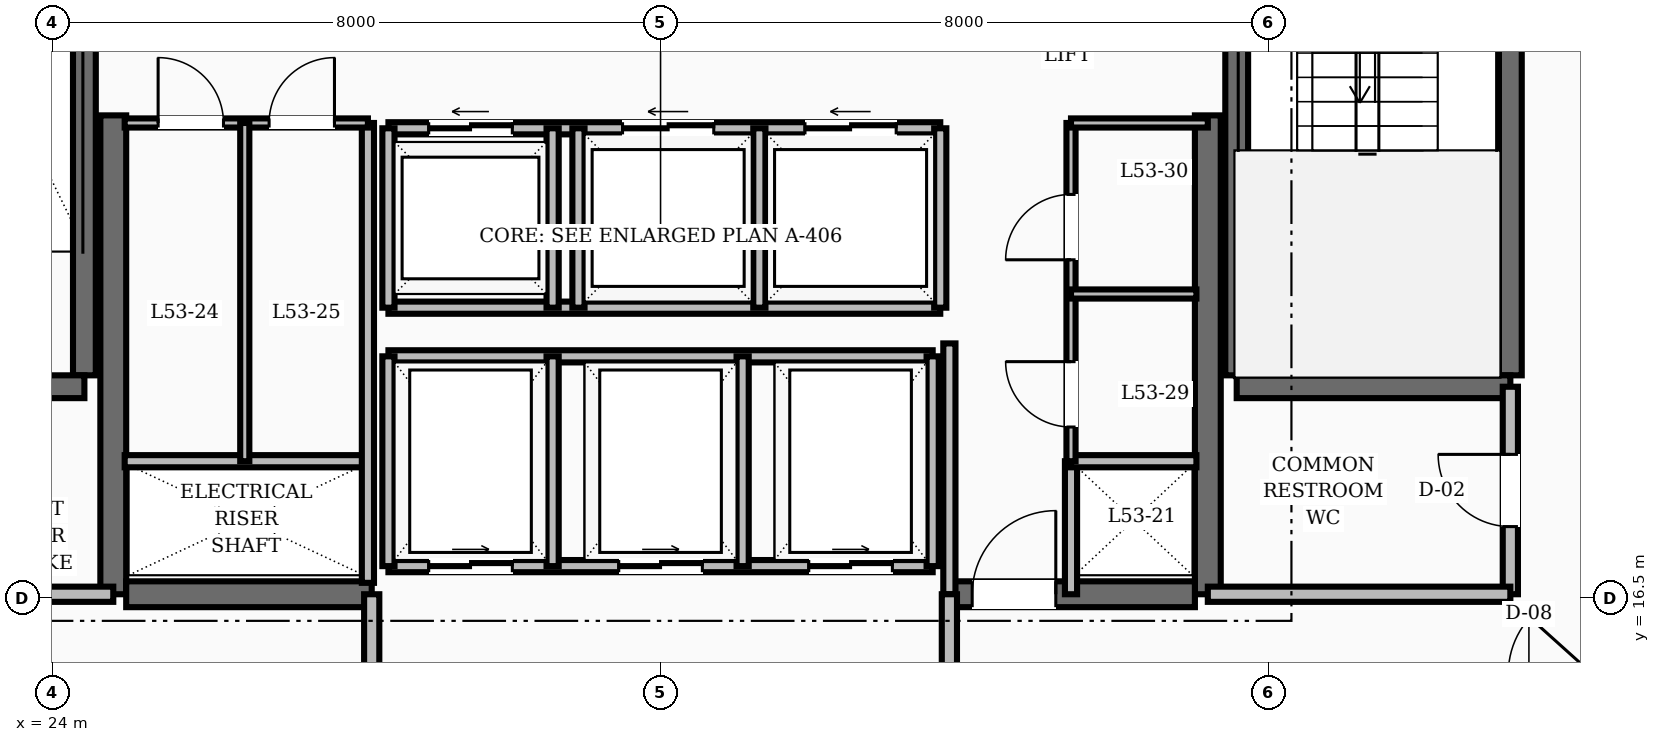
"""IFC4 building model, lengths in metres.
Left out: names, types, materials, properties, quantities, classifications, styles, units other than length and angle.
Written with IfcOpenShell. Run it as: python <this file> out.ifc"""

import sys

from ifc_helpers import new_model, si_unit, direction, frame, frame_2d, origin, place, context, subcontext, project, spatial, rectangle, extrude, element, fill, save


model = new_model("IFC4")
c1 = context("Model", 3, precision=1e-05, world=origin(), true_north=direction((0.0, 1.0)))
c2 = subcontext(c1, "Body", "Model", "MODEL_VIEW")
j1 = project(units=[si_unit("LENGTHUNIT", "METRE"), si_unit("PLANEANGLEUNIT", "RADIAN")], contexts=[c1])
p1 = place(None, origin())
s1 = spatial("IfcSite", under=j1, at=p1, CompositionType="ELEMENT")
p2 = place(p1, origin())
s2 = spatial("IfcBuilding", under=s1, at=p2, CompositionType="ELEMENT")
p3 = place(p2, frame((0.0, 0.0, 203.6)))
s3 = spatial("IfcBuildingStorey", under=s2, at=p3, CompositionType="ELEMENT", Elevation=203.6)
for number, where, z_axis, x_axis in (
    (1, (24.8, 16.55, 0.0), (0.0, 0.0, 1.0), (0.0, 1.0, 0.0)),
    (2, (39.2, 16.55, 0.0), (0.0, 0.0, 1.0), (0.0, 1.0, 0.0)),
):
    element("IfcWall", number, at=place(p3, frame(where, z_axis=z_axis, x_axis=x_axis)), inside=s3, PredefinedType="SHEAR", context=c2, shape_type="SweptSolid", body=[
        extrude(rectangle(XDim=6.3, YDim=0.34, at=frame_2d((3.15, 0.0))), origin(), (0.0, 0.0, 1.0), 4.8),
    ])
p4 = place(p3, frame((24.97, 16.55, 0.0), z_axis=(0.0, 0.0, 1.0), x_axis=(1.0, 0.0, 0.0)))
e3 = element("IfcWall", 3, at=p4, inside=s3, PredefinedType="SHEAR", context=c2, shape_type="SweptSolid", body=[
    extrude(rectangle(XDim=3.23, YDim=0.34, at=frame_2d((1.615, 0.0))), origin(), (0.0, 0.0, 1.0), 4.8),
])
p5 = place(p3, frame((35.8, 16.55, 0.0), z_axis=(0.0, 0.0, 1.0), x_axis=(1.0, 0.0, 0.0)))
e4 = element("IfcWall", 4, at=p5, inside=s3, PredefinedType="SHEAR", context=c2, shape_type="SweptSolid", body=[
    extrude(rectangle(XDim=3.23, YDim=0.34, at=frame_2d((1.615, 0.0))), origin(), (0.0, 0.0, 1.0), 4.8),
])
p6 = place(p5, frame((0.3, 0.0, 0.0)))
e5 = element("IfcOpeningElement", 5, at=p6, cuts=e4, PredefinedType="OPENING", context=c2, shape_type="SweptSolid", body=[
    extrude(rectangle(XDim=1.1, YDim=2.1, at=frame_2d((0.55, 1.05))), frame((0.0, 0.18, 0.0), z_axis=(0.0, -1.0, 0.0), x_axis=(1.0, 0.0, 0.0)), (0.0, 0.0, 1.0), 0.36),
])
p7 = place(p3, frame((24.42, 19.43, 0.0), z_axis=(0.0, 0.0, 1.0), x_axis=(0.0, 1.0, 0.0)))
e6 = element("IfcWall", 6, at=p7, inside=s3, PredefinedType="SHEAR", context=c2, shape_type="SweptSolid", body=[
    extrude(rectangle(XDim=8.74, YDim=0.3, at=frame_2d((4.37, 0.0))), origin(), (0.0, 0.0, 1.0), 4.8),
])
p8 = place(p3, frame((20.82, 19.28, 0.0), z_axis=(0.0, 0.0, 1.0), x_axis=(1.0, 0.0, 0.0)))
e7 = element("IfcWall", 7, at=p8, inside=s3, PredefinedType="SHEAR", context=c2, shape_type="SweptSolid", body=[
    extrude(rectangle(XDim=3.6, YDim=0.3, at=frame_2d((1.8, 0.0))), origin(), (0.0, 0.0, 1.0), 4.8),
])
p9 = place(p8, frame((1.3, 0.0, 0.0)))
e8 = element("IfcOpeningElement", 8, at=p9, cuts=e7, PredefinedType="OPENING", context=c2, shape_type="SweptSolid", body=[
    extrude(rectangle(XDim=1.1, YDim=2.1, at=frame_2d((0.55, 1.05))), frame((0.0, 0.16, 0.0), z_axis=(0.0, -1.0, 0.0), x_axis=(1.0, 0.0, 0.0)), (0.0, 0.0, 1.0), 0.32),
])
for number, where, z_axis, x_axis in (
    (9, (43.18, 19.43, 0.0), (0.0, 0.0, 1.0), (0.0, 1.0, 0.0)),
    (10, (39.58, 19.43, 0.0), (0.0, 0.0, 1.0), (0.0, 1.0, 0.0)),
):
    element("IfcWall", number, at=place(p3, frame(where, z_axis=z_axis, x_axis=x_axis)), inside=s3, PredefinedType="SHEAR", context=c2, shape_type="SweptSolid", body=[
        extrude(rectangle(XDim=8.74, YDim=0.3, at=frame_2d((4.37, 0.0))), origin(), (0.0, 0.0, 1.0), 4.8),
    ])
p10 = place(p3, frame((39.58, 19.28, 0.0), z_axis=(0.0, 0.0, 1.0), x_axis=(1.0, 0.0, 0.0)))
e11 = element("IfcWall", 11, at=p10, inside=s3, PredefinedType="SHEAR", context=c2, shape_type="SweptSolid", body=[
    extrude(rectangle(XDim=3.6, YDim=0.3, at=frame_2d((1.8, 0.0))), origin(), (0.0, 0.0, 1.0), 4.8),
])
p11 = place(p3, frame((20.82, 16.55, 0.0), z_axis=(0.0, 0.0, 1.0), x_axis=(1.0, 0.0, 0.0)))
e12 = element("IfcWall", 12, at=p11, inside=s3, PredefinedType="SOLIDWALL", context=c2, shape_type="SweptSolid", body=[
    extrude(rectangle(XDim=3.98, YDim=0.2, at=frame_2d((1.99, 0.0))), origin(), (0.0, 0.0, 1.0), 3.71),
])
p12 = place(p3, frame((43.18, 16.55, 0.0), z_axis=(0.0, 0.0, 1.0), x_axis=(0.0, 1.0, 0.0)))
e13 = element("IfcWall", 13, at=p12, inside=s3, PredefinedType="SOLIDWALL", context=c2, shape_type="SweptSolid", body=[
    extrude(rectangle(XDim=2.73, YDim=0.2, at=frame_2d((1.365, 0.0))), origin(), (0.0, 0.0, 1.0), 3.71),
])
p13 = place(p12, frame((0.89, 0.0, 0.0)))
e14 = element("IfcOpeningElement", 14, at=p13, cuts=e13, PredefinedType="OPENING", context=c2, shape_type="SweptSolid", body=[
    extrude(rectangle(XDim=0.95, YDim=2.1, at=frame_2d((0.475, 1.05))), frame((0.0, 0.11, 0.0), z_axis=(0.0, -1.0, 0.0), x_axis=(1.0, 0.0, 0.0)), (0.0, 0.0, 1.0), 0.22),
])
p14 = place(p3, frame((39.2, 16.55, 0.0), z_axis=(0.0, 0.0, 1.0), x_axis=(1.0, 0.0, 0.0)))
e15 = element("IfcWall", 15, at=p14, inside=s3, PredefinedType="SOLIDWALL", context=c2, shape_type="SweptSolid", body=[
    extrude(rectangle(XDim=3.98, YDim=0.2, at=frame_2d((1.99, 0.0))), origin(), (0.0, 0.0, 1.0), 3.71),
])
p15 = place(p3, frame((35.8, 16.55, 0.0), z_axis=(0.0, 0.0, 1.0), x_axis=(0.0, 1.0, 0.0)))
e16 = element("IfcWall", 16, at=p15, inside=s3, PredefinedType="SOLIDWALL", context=c2, shape_type="SweptSolid", body=[
    extrude(rectangle(XDim=3.3, YDim=0.16, at=frame_2d((1.65, 0.0))), origin(), (0.0, 0.0, 1.0), 3.71),
])
p16 = place(p3, frame((37.4, 16.55, 0.0), z_axis=(0.0, 0.0, 1.0), x_axis=(0.0, 1.0, 0.0)))
e17 = element("IfcWall", 17, at=p16, inside=s3, PredefinedType="SOLIDWALL", context=c2, shape_type="SweptSolid", body=[
    extrude(rectangle(XDim=1.75, YDim=0.16, at=frame_2d((0.875, 0.0))), origin(), (0.0, 0.0, 1.0), 3.71),
])
for number, where, z_axis, x_axis in (
    (18, (28.2, 14.35, 0.0), (0.0, 0.0, 1.0), (0.0, 1.0, 0.0)),
    (19, (35.8, 14.35, 0.0), (0.0, 0.0, 1.0), (0.0, 1.0, 0.0)),
):
    element("IfcWall", number, at=place(p3, frame(where, z_axis=z_axis, x_axis=x_axis)), inside=s3, PredefinedType="SOLIDWALL", context=c2, shape_type="SweptSolid", body=[
        extrude(rectangle(XDim=2.2, YDim=0.2, at=frame_2d((1.1, 0.0))), origin(), (0.0, 0.0, 1.0), 3.71),
    ])
p17 = place(p3, frame((28.42, 22.68, 0.0), z_axis=(0.0, 0.0, 1.0), x_axis=(1.0, 0.0, 0.0)))
e20 = element("IfcWall", 20, at=p17, inside=s3, PredefinedType="SOLIDWALL", context=c2, shape_type="SweptSolid", body=[
    extrude(rectangle(XDim=7.26, YDim=0.16, at=frame_2d((3.63, 0.0))), origin(), (0.0, 0.0, 1.0), 3.71),
])
p18 = place(p17, frame((0.53, 0.0, 0.0)))
e21 = element("IfcOpeningElement", 21, at=p18, cuts=e20, PredefinedType="OPENING", context=c2, shape_type="SweptSolid", body=[
    extrude(rectangle(XDim=1.1, YDim=2.15, at=frame_2d((0.55, 1.075))), frame((0.0, 0.09, 0.0), z_axis=(0.0, -1.0, 0.0), x_axis=(1.0, 0.0, 0.0)), (0.0, 0.0, 1.0), 0.18),
])
p19 = place(p17, frame((3.08, 0.0, 0.0)))
e22 = element("IfcOpeningElement", 22, at=p19, cuts=e20, PredefinedType="OPENING", context=c2, shape_type="SweptSolid", body=[
    extrude(rectangle(XDim=1.2, YDim=2.15, at=frame_2d((0.6, 1.075))), frame((0.0, 0.09, 0.0), z_axis=(0.0, -1.0, 0.0), x_axis=(1.0, 0.0, 0.0)), (0.0, 0.0, 1.0), 0.18),
])
p20 = place(p17, frame((5.48, 0.0, 0.0)))
e23 = element("IfcOpeningElement", 23, at=p20, cuts=e20, PredefinedType="OPENING", context=c2, shape_type="SweptSolid", body=[
    extrude(rectangle(XDim=1.2, YDim=2.15, at=frame_2d((0.6, 1.075))), frame((0.0, 0.09, 0.0), z_axis=(0.0, -1.0, 0.0), x_axis=(1.0, 0.0, 0.0)), (0.0, 0.0, 1.0), 0.18),
])
p21 = place(p3, frame((28.42, 20.32, 0.0), z_axis=(0.0, 0.0, 1.0), x_axis=(1.0, 0.0, 0.0)))
e24 = element("IfcWall", 24, at=p21, inside=s3, PredefinedType="SOLIDWALL", context=c2, shape_type="SweptSolid", body=[
    extrude(rectangle(XDim=7.26, YDim=0.16, at=frame_2d((3.63, 0.0))), origin(), (0.0, 0.0, 1.0), 3.71),
])
for number, where, z_axis, x_axis in (
    (25, (28.42, 20.32, 0.0), (0.0, 0.0, 1.0), (0.0, 1.0, 0.0)),
    (26, (30.58, 20.32, 0.0), (0.0, 0.0, 1.0), (0.0, 1.0, 0.0)),
    (27, (30.92, 20.32, 0.0), (0.0, 0.0, 1.0), (0.0, 1.0, 0.0)),
    (28, (33.3, 20.32, 0.0), (0.0, 0.0, 1.0), (0.0, 1.0, 0.0)),
    (29, (35.68, 20.32, 0.0), (0.0, 0.0, 1.0), (0.0, 1.0, 0.0)),
):
    element("IfcWall", number, at=place(p3, frame(where, z_axis=z_axis, x_axis=x_axis)), inside=s3, PredefinedType="SOLIDWALL", context=c2, shape_type="SweptSolid", body=[
        extrude(rectangle(XDim=2.36, YDim=0.16, at=frame_2d((1.18, 0.0))), origin(), (0.0, 0.0, 1.0), 3.71),
    ])
p22 = place(p3, frame((28.42, 16.92, 0.0), z_axis=(0.0, 0.0, 1.0), x_axis=(1.0, 0.0, 0.0)))
e30 = element("IfcWall", 30, at=p22, inside=s3, PredefinedType="SOLIDWALL", context=c2, shape_type="SweptSolid", body=[
    extrude(rectangle(XDim=7.16, YDim=0.16, at=frame_2d((3.58, 0.0))), origin(), (0.0, 0.0, 1.0), 3.71),
])
p23 = place(p22, frame((0.53, 0.0, 0.0)))
e31 = element("IfcOpeningElement", 31, at=p23, cuts=e30, PredefinedType="OPENING", context=c2, shape_type="SweptSolid", body=[
    extrude(rectangle(XDim=1.1, YDim=2.15, at=frame_2d((0.55, 1.075))), frame((0.0, 0.09, 0.0), z_axis=(0.0, -1.0, 0.0), x_axis=(1.0, 0.0, 0.0)), (0.0, 0.0, 1.0), 0.18),
])
p24 = place(p22, frame((3.03, 0.0, 0.0)))
e32 = element("IfcOpeningElement", 32, at=p24, cuts=e30, PredefinedType="OPENING", context=c2, shape_type="SweptSolid", body=[
    extrude(rectangle(XDim=1.1, YDim=2.15, at=frame_2d((0.55, 1.075))), frame((0.0, 0.09, 0.0), z_axis=(0.0, -1.0, 0.0), x_axis=(1.0, 0.0, 0.0)), (0.0, 0.0, 1.0), 0.18),
])
p25 = place(p22, frame((5.53, 0.0, 0.0)))
e33 = element("IfcOpeningElement", 33, at=p25, cuts=e30, PredefinedType="OPENING", context=c2, shape_type="SweptSolid", body=[
    extrude(rectangle(XDim=1.1, YDim=2.15, at=frame_2d((0.55, 1.075))), frame((0.0, 0.09, 0.0), z_axis=(0.0, -1.0, 0.0), x_axis=(1.0, 0.0, 0.0)), (0.0, 0.0, 1.0), 0.18),
])
p26 = place(p3, frame((28.42, 19.68, 0.0), z_axis=(0.0, 0.0, 1.0), x_axis=(1.0, 0.0, 0.0)))
e34 = element("IfcWall", 34, at=p26, inside=s3, PredefinedType="SOLIDWALL", context=c2, shape_type="SweptSolid", body=[
    extrude(rectangle(XDim=7.16, YDim=0.16, at=frame_2d((3.58, 0.0))), origin(), (0.0, 0.0, 1.0), 3.71),
])
for number, where, z_axis, x_axis in (
    (35, (28.42, 16.92, 0.0), (0.0, 0.0, 1.0), (0.0, 1.0, 0.0)),
    (36, (30.58, 16.92, 0.0), (0.0, 0.0, 1.0), (0.0, 1.0, 0.0)),
    (37, (33.08, 16.92, 0.0), (0.0, 0.0, 1.0), (0.0, 1.0, 0.0)),
    (38, (35.58, 16.92, 0.0), (0.0, 0.0, 1.0), (0.0, 1.0, 0.0)),
):
    element("IfcWall", number, at=place(p3, frame(where, z_axis=z_axis, x_axis=x_axis)), inside=s3, PredefinedType="SOLIDWALL", context=c2, shape_type="SweptSolid", body=[
        extrude(rectangle(XDim=2.76, YDim=0.16, at=frame_2d((1.38, 0.0))), origin(), (0.0, 0.0, 1.0), 3.71),
    ])
p27 = place(p3, frame((24.95, 18.3, 0.0), z_axis=(0.0, 0.0, 1.0), x_axis=(1.0, 0.0, 0.0)))
e39 = element("IfcWall", 39, at=p27, inside=s3, PredefinedType="SOLIDWALL", context=c2, shape_type="SweptSolid", body=[
    extrude(rectangle(XDim=3.2, YDim=0.16, at=frame_2d((1.6, 0.0))), origin(), (0.0, 0.0, 1.0), 3.71),
])
p28 = place(p3, frame((28.15, 16.7, 0.0), z_axis=(0.0, 0.0, 1.0), x_axis=(0.0, 1.0, 0.0)))
e40 = element("IfcWall", 40, at=p28, inside=s3, PredefinedType="SOLIDWALL", context=c2, shape_type="SweptSolid", body=[
    extrude(rectangle(XDim=6.05, YDim=0.16, at=frame_2d((3.025, 0.0))), origin(), (0.0, 0.0, 1.0), 3.71),
])
p29 = place(p3, frame((37.4, 18.3, 0.0), z_axis=(0.0, 0.0, 1.0), x_axis=(1.0, 0.0, 0.0)))
e41 = element("IfcWall", 41, at=p29, inside=s3, PredefinedType="SOLIDWALL", context=c2, shape_type="SweptSolid", body=[
    extrude(rectangle(XDim=1.65, YDim=0.16, at=frame_2d((0.825, 0.0))), origin(), (0.0, 0.0, 1.0), 3.71),
])
p30 = place(p3, frame((24.95, 22.75, 0.0), z_axis=(0.0, 0.0, 1.0), x_axis=(1.0, 0.0, 0.0)))
e42 = element("IfcWall", 42, at=p30, inside=s3, PredefinedType="PARTITIONING", context=c2, shape_type="SweptSolid", body=[
    extrude(rectangle(XDim=3.2, YDim=0.12, at=frame_2d((1.6, 0.0))), origin(), (0.0, 0.0, 1.0), 3.71),
])
p31 = place(p30, frame((0.44, 0.0, 0.0)))
e43 = element("IfcOpeningElement", 43, at=p31, cuts=e42, PredefinedType="OPENING", context=c2, shape_type="SweptSolid", body=[
    extrude(rectangle(XDim=0.86, YDim=2.1, at=frame_2d((0.43, 1.05))), frame((0.0, 0.07, 0.0), z_axis=(0.0, -1.0, 0.0), x_axis=(1.0, 0.0, 0.0)), (0.0, 0.0, 1.0), 0.14),
])
p32 = place(p30, frame((1.9, 0.0, 0.0)))
e44 = element("IfcOpeningElement", 44, at=p32, cuts=e42, PredefinedType="OPENING", context=c2, shape_type="SweptSolid", body=[
    extrude(rectangle(XDim=0.86, YDim=2.1, at=frame_2d((0.43, 1.05))), frame((0.0, 0.07, 0.0), z_axis=(0.0, -1.0, 0.0), x_axis=(1.0, 0.0, 0.0)), (0.0, 0.0, 1.0), 0.14),
])
p33 = place(p3, frame((37.4, 18.3, 0.0), z_axis=(0.0, 0.0, 1.0), x_axis=(0.0, 1.0, 0.0)))
e45 = element("IfcWall", 45, at=p33, inside=s3, PredefinedType="PARTITIONING", context=c2, shape_type="SweptSolid", body=[
    extrude(rectangle(XDim=4.45, YDim=0.12, at=frame_2d((2.225, 0.0))), origin(), (0.0, 0.0, 1.0), 3.71),
])
p34 = place(p33, frame((0.45, 0.0, 0.0)))
e46 = element("IfcOpeningElement", 46, at=p34, cuts=e45, PredefinedType="OPENING", context=c2, shape_type="SweptSolid", body=[
    extrude(rectangle(XDim=0.86, YDim=2.1, at=frame_2d((0.43, 1.05))), frame((0.0, 0.07, 0.0), z_axis=(0.0, -1.0, 0.0), x_axis=(1.0, 0.0, 0.0)), (0.0, 0.0, 1.0), 0.14),
])
p35 = place(p33, frame((2.65, 0.0, 0.0)))
e47 = element("IfcOpeningElement", 47, at=p35, cuts=e45, PredefinedType="OPENING", context=c2, shape_type="SweptSolid", body=[
    extrude(rectangle(XDim=0.86, YDim=2.1, at=frame_2d((0.43, 1.05))), frame((0.0, 0.07, 0.0), z_axis=(0.0, -1.0, 0.0), x_axis=(1.0, 0.0, 0.0)), (0.0, 0.0, 1.0), 0.14),
])
p36 = place(p3, frame((37.4, 22.75, 0.0), z_axis=(0.0, 0.0, 1.0), x_axis=(1.0, 0.0, 0.0)))
e48 = element("IfcWall", 48, at=p36, inside=s3, PredefinedType="PARTITIONING", context=c2, shape_type="SweptSolid", body=[
    extrude(rectangle(XDim=1.8, YDim=0.12, at=frame_2d((0.9, 0.0))), origin(), (0.0, 0.0, 1.0), 3.71),
])
p37 = place(p3, frame((26.53, 18.3, 0.0), z_axis=(0.0, 0.0, 1.0), x_axis=(0.0, 1.0, 0.0)))
e49 = element("IfcWall", 49, at=p37, inside=s3, PredefinedType="PARTITIONING", context=c2, shape_type="SweptSolid", body=[
    extrude(rectangle(XDim=4.45, YDim=0.12, at=frame_2d((2.225, 0.0))), origin(), (0.0, 0.0, 1.0), 3.71),
])
p38 = place(p3, frame((37.4, 20.5, 0.0), z_axis=(0.0, 0.0, 1.0), x_axis=(1.0, 0.0, 0.0)))
e50 = element("IfcWall", 50, at=p38, inside=s3, PredefinedType="PARTITIONING", context=c2, shape_type="SweptSolid", body=[
    extrude(rectangle(XDim=1.65, YDim=0.12, at=frame_2d((0.825, 0.0))), origin(), (0.0, 0.0, 1.0), 3.71),
])
p39 = place(p3, frame((42.925, 14.03, 0.0), z_axis=(0.0, 0.0, 1.0), x_axis=(0.668645478294, 0.743581350194, 0.0)))
e51 = element("IfcWall", 51, at=p39, inside=s3, PredefinedType="SOLIDWALL", context=c2, shape_type="SweptSolid", body=[
    extrude(rectangle(XDim=2.874, YDim=0.16, at=frame_2d((1.437, 0.0))), origin(), (0.0, 0.0, 1.0), 3.71),
])
p40 = place(p39, frame((0.887, 0.0, 0.0)))
e52 = element("IfcOpeningElement", 52, at=p40, cuts=e51, PredefinedType="OPENING", context=c2, shape_type="SweptSolid", body=[
    extrude(rectangle(XDim=1.1, YDim=2.1, at=frame_2d((0.55, 1.05))), frame((0.0, 0.09, 0.0), z_axis=(0.0, -1.0, 0.0), x_axis=(1.0, 0.0, 0.0)), (0.0, 0.0, 1.0), 0.18),
])
p41 = place(p13, origin())
e53 = element("IfcDoor", 53, at=p41, inside=s3, OperationType="SINGLE_SWING_RIGHT", PredefinedType="DOOR", context=c2, shape_type="SweptSolid", body=[
    extrude(rectangle(XDim=0.95, YDim=2.1, at=frame_2d((0.475, 1.05))), frame((0.0, 0.025, 0.0), z_axis=(0.0, -1.0, 0.0), x_axis=(1.0, 0.0, 0.0)), (0.0, 0.0, 1.0), 0.05),
])
fill(e14, e53)
p42 = place(p6, origin())
e54 = element("IfcDoor", 54, at=p42, inside=s3, OperationType="SINGLE_SWING_RIGHT", PredefinedType="DOOR", context=c2, shape_type="SweptSolid", body=[
    extrude(rectangle(XDim=1.1, YDim=2.1, at=frame_2d((0.55, 1.05))), frame((0.0, 0.025, 0.0), z_axis=(0.0, -1.0, 0.0), x_axis=(1.0, 0.0, 0.0)), (0.0, 0.0, 1.0), 0.05),
])
fill(e5, e54)
p43 = place(p18, origin())
e55 = element("IfcDoor", 55, at=p43, inside=s3, OperationType="SLIDING_TO_LEFT", PredefinedType="DOOR", context=c2, shape_type="SweptSolid", body=[
    extrude(rectangle(XDim=1.1, YDim=2.15, at=frame_2d((0.55, 1.075))), frame((0.0, 0.025, 0.0), z_axis=(0.0, -1.0, 0.0), x_axis=(1.0, 0.0, 0.0)), (0.0, 0.0, 1.0), 0.05),
])
fill(e21, e55)
p44 = place(p19, origin())
e56 = element("IfcDoor", 56, at=p44, inside=s3, OperationType="SLIDING_TO_LEFT", PredefinedType="DOOR", context=c2, shape_type="SweptSolid", body=[
    extrude(rectangle(XDim=1.2, YDim=2.15, at=frame_2d((0.6, 1.075))), frame((0.0, 0.025, 0.0), z_axis=(0.0, -1.0, 0.0), x_axis=(1.0, 0.0, 0.0)), (0.0, 0.0, 1.0), 0.05),
])
fill(e22, e56)
p45 = place(p20, origin())
e57 = element("IfcDoor", 57, at=p45, inside=s3, OperationType="SLIDING_TO_LEFT", PredefinedType="DOOR", context=c2, shape_type="SweptSolid", body=[
    extrude(rectangle(XDim=1.2, YDim=2.15, at=frame_2d((0.6, 1.075))), frame((0.0, 0.025, 0.0), z_axis=(0.0, -1.0, 0.0), x_axis=(1.0, 0.0, 0.0)), (0.0, 0.0, 1.0), 0.05),
])
fill(e23, e57)
p46 = place(p23, origin())
e58 = element("IfcDoor", 58, at=p46, inside=s3, OperationType="SLIDING_TO_RIGHT", PredefinedType="DOOR", context=c2, shape_type="SweptSolid", body=[
    extrude(rectangle(XDim=1.1, YDim=2.15, at=frame_2d((0.55, 1.075))), frame((0.0, 0.025, 0.0), z_axis=(0.0, -1.0, 0.0), x_axis=(1.0, 0.0, 0.0)), (0.0, 0.0, 1.0), 0.05),
])
fill(e31, e58)
p47 = place(p24, origin())
e59 = element("IfcDoor", 59, at=p47, inside=s3, OperationType="SLIDING_TO_RIGHT", PredefinedType="DOOR", context=c2, shape_type="SweptSolid", body=[
    extrude(rectangle(XDim=1.1, YDim=2.15, at=frame_2d((0.55, 1.075))), frame((0.0, 0.025, 0.0), z_axis=(0.0, -1.0, 0.0), x_axis=(1.0, 0.0, 0.0)), (0.0, 0.0, 1.0), 0.05),
])
fill(e32, e59)
p48 = place(p25, origin())
e60 = element("IfcDoor", 60, at=p48, inside=s3, OperationType="SLIDING_TO_RIGHT", PredefinedType="DOOR", context=c2, shape_type="SweptSolid", body=[
    extrude(rectangle(XDim=1.1, YDim=2.15, at=frame_2d((0.55, 1.075))), frame((0.0, 0.025, 0.0), z_axis=(0.0, -1.0, 0.0), x_axis=(1.0, 0.0, 0.0)), (0.0, 0.0, 1.0), 0.05),
])
fill(e33, e60)
p49 = place(p31, origin())
e61 = element("IfcDoor", 61, at=p49, inside=s3, OperationType="SINGLE_SWING_LEFT", PredefinedType="DOOR", context=c2, shape_type="SweptSolid", body=[
    extrude(rectangle(XDim=0.86, YDim=2.1, at=frame_2d((0.43, 1.05))), frame((0.0, 0.025, 0.0), z_axis=(0.0, -1.0, 0.0), x_axis=(1.0, 0.0, 0.0)), (0.0, 0.0, 1.0), 0.05),
])
fill(e43, e61)
p50 = place(p32, origin())
e62 = element("IfcDoor", 62, at=p50, inside=s3, OperationType="SINGLE_SWING_RIGHT", PredefinedType="DOOR", context=c2, shape_type="SweptSolid", body=[
    extrude(rectangle(XDim=0.86, YDim=2.1, at=frame_2d((0.43, 1.05))), frame((0.0, 0.025, 0.0), z_axis=(0.0, -1.0, 0.0), x_axis=(1.0, 0.0, 0.0)), (0.0, 0.0, 1.0), 0.05),
])
fill(e44, e62)
p51 = place(p34, origin())
e63 = element("IfcDoor", 63, at=p51, inside=s3, OperationType="SINGLE_SWING_RIGHT", PredefinedType="DOOR", context=c2, shape_type="SweptSolid", body=[
    extrude(rectangle(XDim=0.86, YDim=2.1, at=frame_2d((0.43, 1.05))), frame((0.0, 0.025, 0.0), z_axis=(0.0, -1.0, 0.0), x_axis=(1.0, 0.0, 0.0)), (0.0, 0.0, 1.0), 0.05),
])
fill(e46, e63)
p52 = place(p35, origin())
e64 = element("IfcDoor", 64, at=p52, inside=s3, OperationType="SINGLE_SWING_LEFT", PredefinedType="DOOR", context=c2, shape_type="SweptSolid", body=[
    extrude(rectangle(XDim=0.86, YDim=2.1, at=frame_2d((0.43, 1.05))), frame((0.0, 0.025, 0.0), z_axis=(0.0, -1.0, 0.0), x_axis=(1.0, 0.0, 0.0)), (0.0, 0.0, 1.0), 0.05),
])
fill(e47, e64)
save(model, sys.argv[1])
